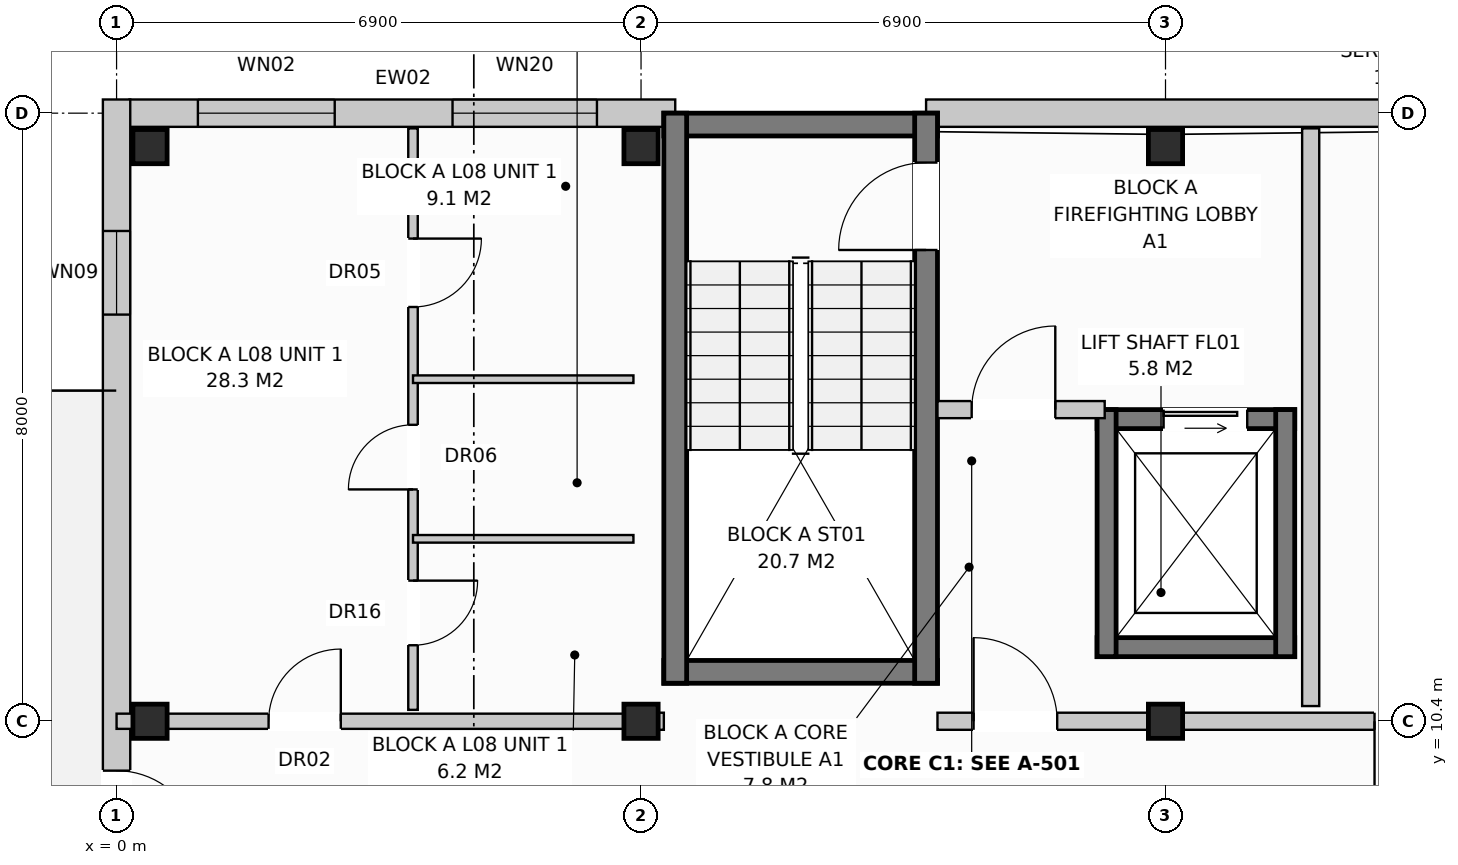
"""IFC4 building model, lengths in metres.
Left out: names, types, materials, properties, quantities, classifications, styles, units other than length and angle.
Written with IfcOpenShell. Run it as: python <this file> out.ifc"""

import sys

from ifc_helpers import new_model, si_unit, direction, frame, frame_2d, origin, origin_with_axes, origin_2d, place, context, subcontext, project, spatial, rectangle, extrude, element, fill, save


model = new_model("IFC4")
c1 = context("Model", 3, precision=1e-05, world=origin(), true_north=direction((0.0, 1.0)))
c2 = subcontext(c1, "Body", "Model", "MODEL_VIEW")
j1 = project(units=[si_unit("LENGTHUNIT", "METRE"), si_unit("PLANEANGLEUNIT", "RADIAN")], contexts=[c1])
p1 = place(None, origin())
s1 = spatial("IfcSite", under=j1, at=p1, CompositionType="ELEMENT")
p2 = place(p1, origin())
s2 = spatial("IfcBuilding", under=s1, at=p2, CompositionType="ELEMENT")
p3 = place(p2, frame((0.0, 0.0, 27.2)))
s3 = spatial("IfcBuildingStorey", under=s2, at=p3, CompositionType="ELEMENT", Elevation=27.2)
for number, where, z_axis, x_axis in (
    (1, (0.44, 10.4, 0.0), (0.0, 0.0, 1.0), (1.0, 0.0, 0.0)),
    (2, (0.44, 17.96, 0.0), (0.0, 0.0, 1.0), (1.0, 0.0, 0.0)),
    (3, (6.9, 10.4, 0.0), (0.0, 0.0, 1.0), (1.0, 0.0, 0.0)),
    (4, (6.9, 17.96, 0.0), (0.0, 0.0, 1.0), (1.0, 0.0, 0.0)),
    (5, (13.8, 10.4, 0.0), (0.0, 0.0, 1.0), (1.0, 0.0, 0.0)),
    (6, (13.8, 17.96, 0.0), (0.0, 0.0, 1.0), (1.0, 0.0, 0.0)),
):
    element("IfcColumn", number, at=place(p3, frame(where, z_axis=z_axis, x_axis=x_axis)), inside=s3, PredefinedType="COLUMN", context=c2, shape_type="SweptSolid", body=[
        extrude(rectangle(XDim=0.45, YDim=0.45, at=origin_2d()), origin(), (0.0, 0.0, 1.0), 3.2),
    ])
p4 = place(p3, frame((0.17, 18.4, 0.0), z_axis=(0.0, 0.0, 1.0), x_axis=(1.0, 0.0, 0.0)))
e7 = element("IfcWall", 7, at=p4, inside=s3, PredefinedType="STANDARD", context=c2, shape_type="SweptSolid", body=[
    extrude(rectangle(XDim=7.18, YDim=0.36, at=frame_2d((3.59, 0.0))), origin(), (0.0, 0.0, 1.0), 2.96),
])
p5 = place(p4, frame((0.9, 0.0, 0.8)))
e8 = element("IfcOpeningElement", 8, at=p5, cuts=e7, PredefinedType="OPENING", context=c2, shape_type="SweptSolid", body=[
    extrude(rectangle(XDim=1.8, YDim=1.7, at=frame_2d((0.9, 0.85))), frame((0.0, 0.192, 0.0), z_axis=(0.0, -1.0, 0.0), x_axis=(1.0, 0.0, 0.0)), (0.0, 0.0, 1.0), 0.384),
])
p6 = place(p4, frame((4.25, 0.0, 0.8)))
e9 = element("IfcOpeningElement", 9, at=p6, cuts=e7, PredefinedType="OPENING", context=c2, shape_type="SweptSolid", body=[
    extrude(rectangle(XDim=1.9, YDim=1.85, at=frame_2d((0.95, 0.925))), frame((0.0, 0.192, 0.0), z_axis=(0.0, -1.0, 0.0), x_axis=(1.0, 0.0, 0.0)), (0.0, 0.0, 1.0), 0.384),
])
p7 = place(p3, frame((10.65, 18.4, 0.0), z_axis=(0.0, 0.0, 1.0), x_axis=(1.0, 0.0, 0.0)))
e10 = element("IfcWall", 10, at=p7, inside=s3, PredefinedType="STANDARD", context=c2, shape_type="SweptSolid", body=[
    extrude(rectangle(XDim=17.4, YDim=0.36, at=frame_2d((8.7, 0.0))), origin(), (0.0, 0.0, 1.0), 2.96),
])
p8 = place(p7, frame((11.82, 0.0, 0.0)))
e11 = element("IfcOpeningElement", 11, at=p8, cuts=e10, PredefinedType="OPENING", context=c2, shape_type="SweptSolid", body=[
    extrude(rectangle(XDim=1.05, YDim=2.12, at=frame_2d((0.525, 1.06))), frame((0.0, 0.192, 0.0), z_axis=(0.0, -1.0, 0.0), x_axis=(1.0, 0.0, 0.0)), (0.0, 0.0, 1.0), 0.384),
])
p9 = place(p7, frame((14.97, 0.0, 0.72)))
e12 = element("IfcOpeningElement", 12, at=p9, cuts=e10, PredefinedType="OPENING", context=c2, shape_type="SweptSolid", body=[
    extrude(rectangle(XDim=1.1, YDim=1.5, at=frame_2d((0.55, 0.75))), frame((0.0, 0.192, 0.0), z_axis=(0.0, -1.0, 0.0), x_axis=(1.0, 0.0, 0.0)), (0.0, 0.0, 1.0), 0.384),
])
p10 = place(p3, frame((0.0, -0.18, 0.0), z_axis=(0.0, 0.0, 1.0), x_axis=(0.0, 1.0, 0.0)))
e13 = element("IfcWall", 13, at=p10, inside=s3, PredefinedType="STANDARD", context=c2, shape_type="SweptSolid", body=[
    extrude(rectangle(XDim=18.76, YDim=0.36, at=frame_2d((9.38, 0.0))), origin(), (0.0, 0.0, 1.0), 2.96),
])
p11 = place(p10, frame((8.83, 0.0, 0.0)))
e14 = element("IfcOpeningElement", 14, at=p11, cuts=e13, PredefinedType="OPENING", context=c2, shape_type="SweptSolid", body=[
    extrude(rectangle(XDim=1.1, YDim=2.1, at=frame_2d((0.55, 1.05))), frame((0.0, 0.192, 0.0), z_axis=(0.0, -1.0, 0.0), x_axis=(1.0, 0.0, 0.0)), (0.0, 0.0, 1.0), 0.384),
])
p12 = place(p10, frame((1.73, 0.0, 0.72)))
e15 = element("IfcOpeningElement", 15, at=p12, cuts=e13, PredefinedType="OPENING", context=c2, shape_type="SweptSolid", body=[
    extrude(rectangle(XDim=1.1, YDim=1.5, at=frame_2d((0.55, 0.75))), frame((0.0, 0.192, 0.0), z_axis=(0.0, -1.0, 0.0), x_axis=(1.0, 0.0, 0.0)), (0.0, 0.0, 1.0), 0.384),
])
p13 = place(p10, frame((15.93, 0.0, 0.72)))
e16 = element("IfcOpeningElement", 16, at=p13, cuts=e13, PredefinedType="OPENING", context=c2, shape_type="SweptSolid", body=[
    extrude(rectangle(XDim=1.1, YDim=1.5, at=frame_2d((0.55, 0.75))), frame((0.0, 0.192, 0.0), z_axis=(0.0, -1.0, 0.0), x_axis=(1.0, 0.0, 0.0)), (0.0, 0.0, 1.0), 0.384),
])
for number, where, z_axis, x_axis in (
    (17, (7.2, 18.25, 0.0), (0.0, 0.0, 1.0), (1.0, 0.0, 0.0)),
    (18, (7.2, 11.05, 0.0), (0.0, 0.0, 1.0), (1.0, 0.0, 0.0)),
):
    element("IfcWall", number, at=place(p3, frame(where, z_axis=z_axis, x_axis=x_axis)), inside=s3, PredefinedType="SHEAR", context=c2, shape_type="SweptSolid", body=[
        extrude(rectangle(XDim=3.6, YDim=0.3, at=frame_2d((1.8, 0.0))), origin(), (0.0, 0.0, 1.0), 2.96),
    ])
p14 = place(p3, frame((7.35, 10.9, 0.0), z_axis=(0.0, 0.0, 1.0), x_axis=(0.0, 1.0, 0.0)))
e19 = element("IfcWall", 19, at=p14, inside=s3, PredefinedType="SHEAR", context=c2, shape_type="SweptSolid", body=[
    extrude(rectangle(XDim=7.5, YDim=0.3, at=frame_2d((3.75, 0.0))), origin(), (0.0, 0.0, 1.0), 2.96),
])
p15 = place(p3, frame((10.65, 10.9, 0.0), z_axis=(0.0, 0.0, 1.0), x_axis=(0.0, 1.0, 0.0)))
e20 = element("IfcWall", 20, at=p15, inside=s3, PredefinedType="SHEAR", context=c2, shape_type="SweptSolid", body=[
    extrude(rectangle(XDim=7.5, YDim=0.3, at=frame_2d((3.75, 0.0))), origin(), (0.0, 0.0, 1.0), 2.96),
])
p16 = place(p15, frame((5.7, 0.0, 0.0)))
e21 = element("IfcOpeningElement", 21, at=p16, cuts=e20, PredefinedType="OPENING", context=c2, shape_type="SweptSolid", body=[
    extrude(rectangle(XDim=1.15, YDim=2.15, at=frame_2d((0.575, 1.075))), frame((0.0, 0.162, 0.0), z_axis=(0.0, -1.0, 0.0), x_axis=(1.0, 0.0, 0.0)), (0.0, 0.0, 1.0), 0.324),
])
p17 = place(p3, frame((12.9, 14.375, 0.0), z_axis=(0.0, 0.0, 1.0), x_axis=(1.0, 0.0, 0.0)))
e22 = element("IfcWall", 22, at=p17, inside=s3, PredefinedType="SHEAR", context=c2, shape_type="SweptSolid", body=[
    extrude(rectangle(XDim=2.6, YDim=0.25, at=frame_2d((1.3, 0.0))), origin(), (0.0, 0.0, 1.0), 2.96),
])
p18 = place(p17, frame((0.875, 0.0, 0.0)))
e23 = element("IfcOpeningElement", 23, at=p18, cuts=e22, PredefinedType="OPENING", context=c2, shape_type="SweptSolid", body=[
    extrude(rectangle(XDim=1.1, YDim=2.1, at=frame_2d((0.55, 1.05))), frame((0.0, 0.137, 0.0), z_axis=(0.0, -1.0, 0.0), x_axis=(1.0, 0.0, 0.0)), (0.0, 0.0, 1.0), 0.274),
])
p19 = place(p3, frame((12.9, 11.375, 0.0), z_axis=(0.0, 0.0, 1.0), x_axis=(1.0, 0.0, 0.0)))
e24 = element("IfcWall", 24, at=p19, inside=s3, PredefinedType="SHEAR", context=c2, shape_type="SweptSolid", body=[
    extrude(rectangle(XDim=2.6, YDim=0.25, at=frame_2d((1.3, 0.0))), origin(), (0.0, 0.0, 1.0), 2.96),
])
for number, where, z_axis, x_axis in (
    (25, (13.025, 11.25, 0.0), (0.0, 0.0, 1.0), (0.0, 1.0, 0.0)),
    (26, (15.375, 11.25, 0.0), (0.0, 0.0, 1.0), (0.0, 1.0, 0.0)),
):
    element("IfcWall", number, at=place(p3, frame(where, z_axis=z_axis, x_axis=x_axis)), inside=s3, PredefinedType="SHEAR", context=c2, shape_type="SweptSolid", body=[
        extrude(rectangle(XDim=3.25, YDim=0.25, at=frame_2d((1.625, 0.0))), origin(), (0.0, 0.0, 1.0), 2.96),
    ])
p20 = place(p3, frame((15.71, 10.6, 0.0), z_axis=(0.0, 0.0, 1.0), x_axis=(0.0, 1.0, 0.0)))
e27 = element("IfcWall", 27, at=p20, inside=s3, PredefinedType="PARTITIONING", context=c2, shape_type="SweptSolid", body=[
    extrude(rectangle(XDim=7.6, YDim=0.225, at=frame_2d((3.8, 0.0))), origin(), (0.0, 0.0, 1.0), 2.59),
])
p21 = place(p3, frame((10.8, 14.5, 0.0), z_axis=(0.0, 0.0, 1.0), x_axis=(1.0, 0.0, 0.0)))
e28 = element("IfcWall", 28, at=p21, inside=s3, PredefinedType="PARTITIONING", context=c2, shape_type="SweptSolid", body=[
    extrude(rectangle(XDim=2.2, YDim=0.225, at=frame_2d((1.1, 0.0))), origin(), (0.0, 0.0, 1.0), 2.96),
])
p22 = place(p21, frame((0.45, 0.0, 0.0)))
e29 = element("IfcOpeningElement", 29, at=p22, cuts=e28, PredefinedType="OPENING", context=c2, shape_type="SweptSolid", body=[
    extrude(rectangle(XDim=1.1, YDim=2.15, at=frame_2d((0.55, 1.075))), frame((0.0, 0.125, 0.0), z_axis=(0.0, -1.0, 0.0), x_axis=(1.0, 0.0, 0.0)), (0.0, 0.0, 1.0), 0.249),
])
p23 = place(p3, frame((6.9, 10.4, 0.0), z_axis=(0.0, 0.0, 1.0), x_axis=(1.0, 0.0, 0.0)))
e30 = element("IfcWall", 30, at=p23, inside=s3, PredefinedType="PARTITIONING", context=c2, shape_type="SweptSolid", body=[
    extrude(rectangle(XDim=0.3, YDim=0.225, at=frame_2d((0.15, 0.0))), origin(), (0.0, 0.0, 1.0), 2.96),
])
p24 = place(p3, frame((10.8, 10.4, 0.0), z_axis=(0.0, 0.0, 1.0), x_axis=(1.0, 0.0, 0.0)))
e31 = element("IfcWall", 31, at=p24, inside=s3, PredefinedType="PARTITIONING", context=c2, shape_type="SweptSolid", body=[
    extrude(rectangle(XDim=9.9, YDim=0.225, at=frame_2d((4.95, 0.0))), origin(), (0.0, 0.0, 1.0), 2.4),
])
p25 = place(p24, frame((0.475, 0.0, 0.0)))
e32 = element("IfcOpeningElement", 32, at=p25, cuts=e31, PredefinedType="OPENING", context=c2, shape_type="SweptSolid", body=[
    extrude(rectangle(XDim=1.1, YDim=2.15, at=frame_2d((0.55, 1.075))), frame((0.0, 0.125, 0.0), z_axis=(0.0, -1.0, 0.0), x_axis=(1.0, 0.0, 0.0)), (0.0, 0.0, 1.0), 0.249),
])
p26 = place(p24, frame((5.75, 0.0, 0.0)))
e33 = element("IfcOpeningElement", 33, at=p26, cuts=e31, PredefinedType="OPENING", context=c2, shape_type="SweptSolid", body=[
    extrude(rectangle(XDim=0.9, YDim=2.1, at=frame_2d((0.45, 1.05))), frame((0.0, 0.125, 0.0), z_axis=(0.0, -1.0, 0.0), x_axis=(1.0, 0.0, 0.0)), (0.0, 0.0, 1.0), 0.249),
])
p27 = place(p24, frame((7.8, 0.0, 0.0)))
e34 = element("IfcOpeningElement", 34, at=p27, cuts=e31, PredefinedType="OPENING", context=c2, shape_type="SweptSolid", body=[
    extrude(rectangle(XDim=0.95, YDim=2.15, at=frame_2d((0.475, 1.075))), frame((0.0, 0.125, 0.0), z_axis=(0.0, -1.0, 0.0), x_axis=(1.0, 0.0, 0.0)), (0.0, 0.0, 1.0), 0.249),
])
p28 = place(p3, frame((0.0, 10.4, 0.0), z_axis=(0.0, 0.0, 1.0), x_axis=(1.0, 0.0, 0.0)))
e35 = element("IfcWall", 35, at=p28, inside=s3, PredefinedType="PARTITIONING", context=c2, shape_type="SweptSolid", body=[
    extrude(rectangle(XDim=6.9, YDim=0.2, at=frame_2d((3.45, 0.0))), origin(), (0.0, 0.0, 1.0), 2.4),
])
p29 = place(p28, frame((2.0, 0.0, 0.0)))
e36 = element("IfcOpeningElement", 36, at=p29, cuts=e35, PredefinedType="OPENING", context=c2, shape_type="SweptSolid", body=[
    extrude(rectangle(XDim=0.95, YDim=2.15, at=frame_2d((0.475, 1.075))), frame((0.0, 0.112, 0.0), z_axis=(0.0, -1.0, 0.0), x_axis=(1.0, 0.0, 0.0)), (0.0, 0.0, 1.0), 0.224),
])
p30 = place(p3, frame((3.9, 10.55, 0.0), z_axis=(0.0, 0.0, 1.0), x_axis=(0.0, 1.0, 0.0)))
e37 = element("IfcWall", 37, at=p30, inside=s3, PredefinedType="PARTITIONING", context=c2, shape_type="SweptSolid", body=[
    extrude(rectangle(XDim=7.65, YDim=0.125, at=frame_2d((3.825, 0.0))), origin(), (0.0, 0.0, 1.0), 2.96),
])
p31 = place(p30, frame((0.85, 0.0, 0.0)))
e38 = element("IfcOpeningElement", 38, at=p31, cuts=e37, PredefinedType="OPENING", context=c2, shape_type="SweptSolid", body=[
    extrude(rectangle(XDim=0.85, YDim=2.1, at=frame_2d((0.425, 1.05))), frame((0.0, 0.074, 0.0), z_axis=(0.0, -1.0, 0.0), x_axis=(1.0, 0.0, 0.0)), (0.0, 0.0, 1.0), 0.149),
])
p32 = place(p30, frame((2.9, 0.0, 0.0)))
e39 = element("IfcOpeningElement", 39, at=p32, cuts=e37, PredefinedType="OPENING", context=c2, shape_type="SweptSolid", body=[
    extrude(rectangle(XDim=0.85, YDim=2.05, at=frame_2d((0.425, 1.025))), frame((0.0, 0.074, 0.0), z_axis=(0.0, -1.0, 0.0), x_axis=(1.0, 0.0, 0.0)), (0.0, 0.0, 1.0), 0.149),
])
p33 = place(p30, frame((5.3, 0.0, 0.0)))
e40 = element("IfcOpeningElement", 40, at=p33, cuts=e37, PredefinedType="OPENING", context=c2, shape_type="SweptSolid", body=[
    extrude(rectangle(XDim=0.9, YDim=2.1, at=frame_2d((0.45, 1.05))), frame((0.0, 0.074, 0.0), z_axis=(0.0, -1.0, 0.0), x_axis=(1.0, 0.0, 0.0)), (0.0, 0.0, 1.0), 0.149),
])
for number, where, z_axis, x_axis in (
    (41, (3.9, 12.8, 0.0), (0.0, 0.0, 1.0), (1.0, 0.0, 0.0)),
    (42, (3.9, 14.9, 0.0), (0.0, 0.0, 1.0), (1.0, 0.0, 0.0)),
):
    element("IfcWall", number, at=place(p3, frame(where, z_axis=z_axis, x_axis=x_axis)), inside=s3, PredefinedType="PARTITIONING", context=c2, shape_type="SweptSolid", body=[
        extrude(rectangle(XDim=2.9, YDim=0.1, at=frame_2d((1.45, 0.0))), origin(), (0.0, 0.0, 1.0), 2.96),
    ])
p34 = place(p5, origin_with_axes())
e43 = element("IfcWindow", 43, at=p34, inside=s3, PartitioningType="SINGLE_PANEL", PredefinedType="WINDOW", context=c2, shape_type="SweptSolid", body=[
    extrude(rectangle(XDim=1.8, YDim=1.7, at=frame_2d((0.9, 0.85))), frame((0.0, 0.03, 0.0), z_axis=(0.0, -1.0, 0.0), x_axis=(1.0, 0.0, 0.0)), (0.0, 0.0, 1.0), 0.06),
])
fill(e8, e43)
p35 = place(p6, origin_with_axes())
e44 = element("IfcWindow", 44, at=p35, inside=s3, PartitioningType="SINGLE_PANEL", PredefinedType="WINDOW", context=c2, shape_type="SweptSolid", body=[
    extrude(rectangle(XDim=1.9, YDim=1.85, at=frame_2d((0.95, 0.925))), frame((0.0, 0.03, 0.0), z_axis=(0.0, -1.0, 0.0), x_axis=(1.0, 0.0, 0.0)), (0.0, 0.0, 1.0), 0.06),
])
fill(e9, e44)
p36 = place(p11, frame((1.1, 0.0, 0.0), z_axis=(0.0, 0.0, 1.0), x_axis=(-1.0, 0.0, 0.0)))
e45 = element("IfcDoor", 45, at=p36, inside=s3, OperationType="SINGLE_SWING_LEFT", PredefinedType="DOOR", context=c2, shape_type="SweptSolid", body=[
    extrude(rectangle(XDim=1.1, YDim=2.1, at=frame_2d((0.55, 1.05))), frame((0.0, 0.025, 0.0), z_axis=(0.0, -1.0, 0.0), x_axis=(1.0, 0.0, 0.0)), (0.0, 0.0, 1.0), 0.05),
])
fill(e14, e45)
p37 = place(p13, origin_with_axes())
e46 = element("IfcWindow", 46, at=p37, inside=s3, PartitioningType="SINGLE_PANEL", PredefinedType="WINDOW", context=c2, shape_type="SweptSolid", body=[
    extrude(rectangle(XDim=1.1, YDim=1.5, at=frame_2d((0.55, 0.75))), frame((0.0, 0.03, 0.0), z_axis=(0.0, -1.0, 0.0), x_axis=(1.0, 0.0, 0.0)), (0.0, 0.0, 1.0), 0.06),
])
fill(e16, e46)
p38 = place(p16, origin_with_axes())
e47 = element("IfcDoor", 47, at=p38, inside=s3, OperationType="SINGLE_SWING_LEFT", PredefinedType="DOOR", context=c2, shape_type="SweptSolid", body=[
    extrude(rectangle(XDim=1.15, YDim=2.15, at=frame_2d((0.575, 1.075))), frame((0.0, 0.025, 0.0), z_axis=(0.0, -1.0, 0.0), x_axis=(1.0, 0.0, 0.0)), (0.0, 0.0, 1.0), 0.05),
])
fill(e21, e47)
p39 = place(p18, origin_with_axes())
e48 = element("IfcDoor", 48, at=p39, inside=s3, OperationType="SLIDING_TO_LEFT", PredefinedType="DOOR", context=c2, shape_type="SweptSolid", body=[
    extrude(rectangle(XDim=1.1, YDim=2.1, at=frame_2d((0.55, 1.05))), frame((0.0, 0.025, 0.0), z_axis=(0.0, -1.0, 0.0), x_axis=(1.0, 0.0, 0.0)), (0.0, 0.0, 1.0), 0.05),
])
fill(e23, e48)
p40 = place(p22, origin_with_axes())
e49 = element("IfcDoor", 49, at=p40, inside=s3, OperationType="SINGLE_SWING_RIGHT", PredefinedType="DOOR", context=c2, shape_type="SweptSolid", body=[
    extrude(rectangle(XDim=1.1, YDim=2.15, at=frame_2d((0.55, 1.075))), frame((0.0, 0.025, 0.0), z_axis=(0.0, -1.0, 0.0), x_axis=(1.0, 0.0, 0.0)), (0.0, 0.0, 1.0), 0.05),
])
fill(e29, e49)
p41 = place(p25, origin_with_axes())
e50 = element("IfcDoor", 50, at=p41, inside=s3, OperationType="SINGLE_SWING_LEFT", PredefinedType="DOOR", context=c2, shape_type="SweptSolid", body=[
    extrude(rectangle(XDim=1.1, YDim=2.15, at=frame_2d((0.55, 1.075))), frame((0.0, 0.025, 0.0), z_axis=(0.0, -1.0, 0.0), x_axis=(1.0, 0.0, 0.0)), (0.0, 0.0, 1.0), 0.05),
])
fill(e32, e50)
p42 = place(p26, frame((0.9, 0.0, 0.0), z_axis=(0.0, 0.0, 1.0), x_axis=(-1.0, 0.0, 0.0)))
e51 = element("IfcDoor", 51, at=p42, inside=s3, OperationType="SINGLE_SWING_LEFT", PredefinedType="DOOR", context=c2, shape_type="SweptSolid", body=[
    extrude(rectangle(XDim=0.9, YDim=2.1, at=frame_2d((0.45, 1.05))), frame((0.0, 0.025, 0.0), z_axis=(0.0, -1.0, 0.0), x_axis=(1.0, 0.0, 0.0)), (0.0, 0.0, 1.0), 0.05),
])
fill(e33, e51)
p43 = place(p29, origin_with_axes())
e52 = element("IfcDoor", 52, at=p43, inside=s3, OperationType="SINGLE_SWING_RIGHT", PredefinedType="DOOR", context=c2, shape_type="SweptSolid", body=[
    extrude(rectangle(XDim=0.95, YDim=2.15, at=frame_2d((0.475, 1.075))), frame((0.0, 0.025, 0.0), z_axis=(0.0, -1.0, 0.0), x_axis=(1.0, 0.0, 0.0)), (0.0, 0.0, 1.0), 0.05),
])
fill(e36, e52)
p44 = place(p31, frame((0.85, 0.0, 0.0), z_axis=(0.0, 0.0, 1.0), x_axis=(-1.0, 0.0, 0.0)))
e53 = element("IfcDoor", 53, at=p44, inside=s3, OperationType="SINGLE_SWING_RIGHT", PredefinedType="DOOR", context=c2, shape_type="SweptSolid", body=[
    extrude(rectangle(XDim=0.85, YDim=2.1, at=frame_2d((0.425, 1.05))), frame((0.0, 0.025, 0.0), z_axis=(0.0, -1.0, 0.0), x_axis=(1.0, 0.0, 0.0)), (0.0, 0.0, 1.0), 0.05),
])
fill(e38, e53)
p45 = place(p32, origin_with_axes())
e54 = element("IfcDoor", 54, at=p45, inside=s3, OperationType="SINGLE_SWING_LEFT", PredefinedType="DOOR", context=c2, shape_type="SweptSolid", body=[
    extrude(rectangle(XDim=0.85, YDim=2.05, at=frame_2d((0.425, 1.025))), frame((0.0, 0.025, 0.0), z_axis=(0.0, -1.0, 0.0), x_axis=(1.0, 0.0, 0.0)), (0.0, 0.0, 1.0), 0.05),
])
fill(e39, e54)
p46 = place(p33, frame((0.9, 0.0, 0.0), z_axis=(0.0, 0.0, 1.0), x_axis=(-1.0, 0.0, 0.0)))
e55 = element("IfcDoor", 55, at=p46, inside=s3, OperationType="SINGLE_SWING_RIGHT", PredefinedType="DOOR", context=c2, shape_type="SweptSolid", body=[
    extrude(rectangle(XDim=0.9, YDim=2.1, at=frame_2d((0.45, 1.05))), frame((0.0, 0.025, 0.0), z_axis=(0.0, -1.0, 0.0), x_axis=(1.0, 0.0, 0.0)), (0.0, 0.0, 1.0), 0.05),
])
fill(e40, e55)
save(model, sys.argv[1])
